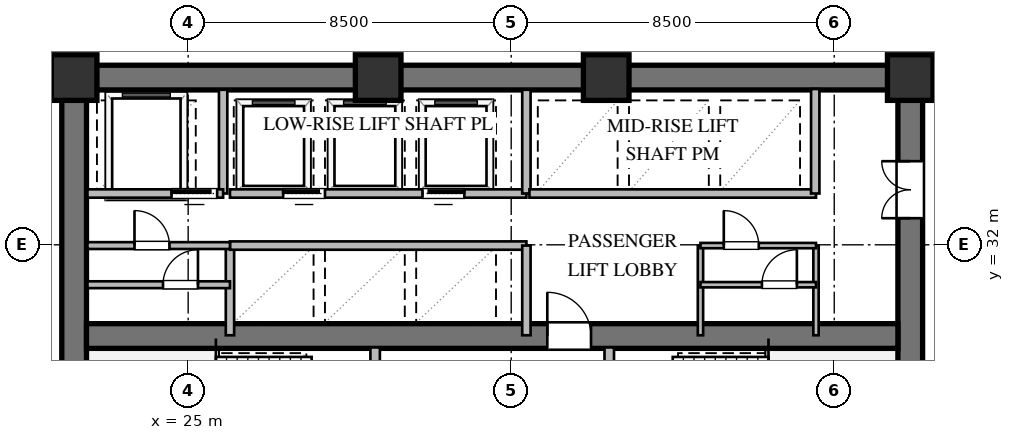
"""IFC4 building model, lengths in metres.
Left out: names, types, materials, properties, quantities, classifications, styles, units other than length and angle.
Written with IfcOpenShell. Run it as: python <this file> out.ifc"""

import sys

from ifc_helpers import new_model, si_unit, direction, frame, frame_2d, origin, origin_2d, place, context, subcontext, project, spatial, rectangle, extrude, element, fill, save


model = new_model("IFC4")
c1 = context("Model", 3, precision=1e-05, world=origin(), true_north=direction((0.0, 1.0)))
c2 = subcontext(c1, "Body", "Model", "MODEL_VIEW")
j1 = project(units=[si_unit("LENGTHUNIT", "METRE"), si_unit("PLANEANGLEUNIT", "RADIAN")], contexts=[c1])
p1 = place(None, origin())
s1 = spatial("IfcSite", under=j1, at=p1, CompositionType="ELEMENT")
p2 = place(p1, origin())
s2 = spatial("IfcBuilding", under=s1, at=p2, CompositionType="ELEMENT")
p3 = place(p2, frame((0.0, 0.0, 24.0)))
s3 = spatial("IfcBuildingStorey", under=s2, at=p3, CompositionType="ELEMENT", Elevation=24.0)
p4 = place(p3, frame((21.675, 36.4, 0.0), z_axis=(0.0, 0.0, 1.0), x_axis=(1.0, 0.0, 0.0)))
e1 = element("IfcWall", 1, at=p4, inside=s3, PredefinedType="SHEAR", context=c2, shape_type="SweptSolid", body=[
    extrude(rectangle(XDim=22.65, YDim=0.65, at=frame_2d((11.325, 0.0))), origin(), (0.0, 0.0, 1.0), 3.36),
])
p5 = place(p3, frame((22.0, 23.925, 0.0), z_axis=(0.0, 0.0, 1.0), x_axis=(0.0, 1.0, 0.0)))
e2 = element("IfcWall", 2, at=p5, inside=s3, PredefinedType="SHEAR", context=c2, shape_type="SweptSolid", body=[
    extrude(rectangle(XDim=12.15, YDim=0.65, at=frame_2d((6.075, 0.0))), origin(), (0.0, 0.0, 1.0), 3.36),
])
p6 = place(p3, frame((44.0, 23.925, 0.0), z_axis=(0.0, 0.0, 1.0), x_axis=(0.0, 1.0, 0.0)))
e3 = element("IfcWall", 3, at=p6, inside=s3, PredefinedType="SHEAR", context=c2, shape_type="SweptSolid", body=[
    extrude(rectangle(XDim=12.15, YDim=0.65, at=frame_2d((6.075, 0.0))), origin(), (0.0, 0.0, 1.0), 3.36),
])
p7 = place(p6, frame((8.775, 0.0, 0.0)))
e4 = element("IfcOpeningElement", 4, at=p7, cuts=e3, PredefinedType="OPENING", context=c2, shape_type="SweptSolid", body=[
    extrude(rectangle(XDim=1.5, YDim=2.15, at=frame_2d((0.75, 1.075))), frame((0.0, 0.335, 0.0), z_axis=(0.0, -1.0, 0.0), x_axis=(1.0, 0.0, 0.0)), (0.0, 0.0, 1.0), 0.67),
])
p8 = place(p3, frame((22.325, 29.6, 0.0), z_axis=(0.0, 0.0, 1.0), x_axis=(1.0, 0.0, 0.0)))
e5 = element("IfcWall", 5, at=p8, inside=s3, PredefinedType="SHEAR", context=c2, shape_type="SweptSolid", body=[
    extrude(rectangle(XDim=21.35, YDim=0.65, at=frame_2d((10.675, 0.0))), origin(), (0.0, 0.0, 1.0), 3.36),
])
p9 = place(p8, frame((12.125, 0.0, 0.0)))
e6 = element("IfcOpeningElement", 6, at=p9, cuts=e5, PredefinedType="OPENING", context=c2, shape_type="SweptSolid", body=[
    extrude(rectangle(XDim=1.15, YDim=2.1, at=frame_2d((0.575, 1.05))), frame((0.0, 0.335, 0.0), z_axis=(0.0, -1.0, 0.0), x_axis=(1.0, 0.0, 0.0)), (0.0, 0.0, 1.0), 0.67),
])
for number, where, z_axis, x_axis in (
    (7, (44.0, 36.4, 0.0), (0.0, 0.0, 1.0), (1.0, 0.0, 0.0)),
    (8, (36.0, 36.4, 0.0), (0.0, 0.0, 1.0), (1.0, 0.0, 0.0)),
    (9, (30.0, 36.4, 0.0), (0.0, 0.0, 1.0), (1.0, 0.0, 0.0)),
    (10, (22.0, 36.4, 0.0), (0.0, 0.0, 1.0), (1.0, 0.0, 0.0)),
):
    element("IfcColumn", number, at=place(p3, frame(where, z_axis=z_axis, x_axis=x_axis)), inside=s3, PredefinedType="COLUMN", context=c2, shape_type="SweptSolid", body=[
        extrude(rectangle(XDim=1.2, YDim=1.2, at=origin_2d()), origin(), (0.0, 0.0, 1.0), 3.6),
    ])
p10 = place(p3, frame((29.92, 23.9, 0.0), z_axis=(0.0, 0.0, 1.0), x_axis=(0.0, 1.0, 0.0)))
e11 = element("IfcWall", 11, at=p10, inside=s3, PredefinedType="SOLIDWALL", context=c2, shape_type="SweptSolid", body=[
    extrude(rectangle(XDim=5.4, YDim=0.25, at=frame_2d((2.7, 0.0))), origin(), (0.0, 0.0, 1.0), 3.36),
])
p11 = place(p10, frame((3.421, 0.0, 0.0)))
e12 = element("IfcOpeningElement", 12, at=p11, cuts=e11, PredefinedType="OPENING", context=c2, shape_type="SweptSolid", body=[
    extrude(rectangle(XDim=1.15, YDim=2.1, at=frame_2d((0.575, 1.05))), frame((0.0, 0.135, 0.0), z_axis=(0.0, -1.0, 0.0), x_axis=(1.0, 0.0, 0.0)), (0.0, 0.0, 1.0), 0.27),
])
p12 = place(p3, frame((36.08, 23.9, 0.0), z_axis=(0.0, 0.0, 1.0), x_axis=(0.0, 1.0, 0.0)))
e13 = element("IfcWall", 13, at=p12, inside=s3, PredefinedType="SOLIDWALL", context=c2, shape_type="SweptSolid", body=[
    extrude(rectangle(XDim=5.4, YDim=0.25, at=frame_2d((2.7, 0.0))), origin(), (0.0, 0.0, 1.0), 3.36),
])
p13 = place(p12, frame((3.421, 0.0, 0.0)))
e14 = element("IfcOpeningElement", 14, at=p13, cuts=e13, PredefinedType="OPENING", context=c2, shape_type="SweptSolid", body=[
    extrude(rectangle(XDim=1.15, YDim=2.1, at=frame_2d((0.575, 1.05))), frame((0.0, 0.135, 0.0), z_axis=(0.0, -1.0, 0.0), x_axis=(1.0, 0.0, 0.0)), (0.0, 0.0, 1.0), 0.27),
])
p14 = place(p3, frame((25.92, 33.35, 0.0), z_axis=(0.0, 0.0, 1.0), x_axis=(0.0, 1.0, 0.0)))
e15 = element("IfcWall", 15, at=p14, inside=s3, PredefinedType="SOLIDWALL", context=c2, shape_type="SweptSolid", body=[
    extrude(rectangle(XDim=2.73, YDim=0.22, at=frame_2d((1.365, 0.0))), origin(), (0.0, 0.0, 1.0), 3.36),
])
p15 = place(p3, frame((22.35, 33.35, 0.0), z_axis=(0.0, 0.0, 1.0), x_axis=(1.0, 0.0, 0.0)))
e16 = element("IfcWall", 16, at=p15, inside=s3, PredefinedType="SOLIDWALL", context=c2, shape_type="SweptSolid", body=[
    extrude(rectangle(XDim=3.57, YDim=0.22, at=frame_2d((1.785, 0.0))), origin(), (0.0, 0.0, 1.0), 3.36),
])
p16 = place(p15, frame((2.213, 0.0, 0.0)))
e17 = element("IfcOpeningElement", 17, at=p16, cuts=e16, PredefinedType="OPENING", context=c2, shape_type="SweptSolid", body=[
    extrude(rectangle(XDim=1.2, YDim=2.1, at=frame_2d((0.6, 1.05))), frame((0.0, 0.12, 0.0), z_axis=(0.0, -1.0, 0.0), x_axis=(1.0, 0.0, 0.0)), (0.0, 0.0, 1.0), 0.24),
])
p17 = place(p3, frame((26.1, 29.62, 0.0), z_axis=(0.0, 0.0, 1.0), x_axis=(0.0, 1.0, 0.0)))
e18 = element("IfcWall", 18, at=p17, inside=s3, PredefinedType="SOLIDWALL", context=c2, shape_type="SweptSolid", body=[
    extrude(rectangle(XDim=2.36, YDim=0.22, at=frame_2d((1.18, 0.0))), origin(), (0.0, 0.0, 1.0), 3.36),
])
p18 = place(p3, frame((26.1, 31.98, 0.0), z_axis=(0.0, 0.0, 1.0), x_axis=(1.0, 0.0, 0.0)))
e19 = element("IfcWall", 19, at=p18, inside=s3, PredefinedType="SOLIDWALL", context=c2, shape_type="SweptSolid", body=[
    extrude(rectangle(XDim=7.8, YDim=0.22, at=frame_2d((3.9, 0.0))), origin(), (0.0, 0.0, 1.0), 3.36),
])
p19 = place(p3, frame((33.9, 29.62, 0.0), z_axis=(0.0, 0.0, 1.0), x_axis=(0.0, 1.0, 0.0)))
e20 = element("IfcWall", 20, at=p19, inside=s3, PredefinedType="SOLIDWALL", context=c2, shape_type="SweptSolid", body=[
    extrude(rectangle(XDim=2.36, YDim=0.22, at=frame_2d((1.18, 0.0))), origin(), (0.0, 0.0, 1.0), 3.36),
])
p20 = place(p3, frame((26.1, 33.35, 0.0), z_axis=(0.0, 0.0, 1.0), x_axis=(1.0, 0.0, 0.0)))
e21 = element("IfcWall", 21, at=p20, inside=s3, PredefinedType="SOLIDWALL", context=c2, shape_type="SweptSolid", body=[
    extrude(rectangle(XDim=7.8, YDim=0.22, at=frame_2d((3.9, 0.0))), origin(), (0.0, 0.0, 1.0), 3.36),
])
p21 = place(p20, frame((1.4, 0.0, 0.0)))
e22 = element("IfcOpeningElement", 22, at=p21, cuts=e21, PredefinedType="OPENING", context=c2, shape_type="SweptSolid", body=[
    extrude(rectangle(XDim=1.1, YDim=2.1, at=frame_2d((0.55, 1.05))), frame((0.0, 0.12, 0.0), z_axis=(0.0, -1.0, 0.0), x_axis=(1.0, 0.0, 0.0)), (0.0, 0.0, 1.0), 0.24),
])
p22 = place(p20, frame((5.066, 0.0, 0.0)))
e23 = element("IfcOpeningElement", 23, at=p22, cuts=e21, PredefinedType="OPENING", context=c2, shape_type="SweptSolid", body=[
    extrude(rectangle(XDim=1.1, YDim=2.1, at=frame_2d((0.55, 1.05))), frame((0.0, 0.12, 0.0), z_axis=(0.0, -1.0, 0.0), x_axis=(1.0, 0.0, 0.0)), (0.0, 0.0, 1.0), 0.24),
])
p23 = place(p3, frame((33.9, 33.35, 0.0), z_axis=(0.0, 0.0, 1.0), x_axis=(0.0, 1.0, 0.0)))
e24 = element("IfcWall", 24, at=p23, inside=s3, PredefinedType="SOLIDWALL", context=c2, shape_type="SweptSolid", body=[
    extrude(rectangle(XDim=2.73, YDim=0.22, at=frame_2d((1.365, 0.0))), origin(), (0.0, 0.0, 1.0), 3.36),
])
p24 = place(p3, frame((33.98, 33.35, 0.0), z_axis=(0.0, 0.0, 1.0), x_axis=(1.0, 0.0, 0.0)))
e25 = element("IfcWall", 25, at=p24, inside=s3, PredefinedType="SOLIDWALL", context=c2, shape_type="SweptSolid", body=[
    extrude(rectangle(XDim=7.54, YDim=0.22, at=frame_2d((3.77, 0.0))), origin(), (0.0, 0.0, 1.0), 3.36),
])
p25 = place(p3, frame((41.5, 33.35, 0.0), z_axis=(0.0, 0.0, 1.0), x_axis=(0.0, 1.0, 0.0)))
e26 = element("IfcWall", 26, at=p25, inside=s3, PredefinedType="SOLIDWALL", context=c2, shape_type="SweptSolid", body=[
    extrude(rectangle(XDim=2.75, YDim=0.22, at=frame_2d((1.375, 0.0))), origin(), (0.0, 0.0, 1.0), 3.36),
])
p26 = place(p3, frame((22.35, 30.95, 0.0), z_axis=(0.0, 0.0, 1.0), x_axis=(1.0, 0.0, 0.0)))
e27 = element("IfcWall", 27, at=p26, inside=s3, PredefinedType="PARTITIONING", context=c2, shape_type="SweptSolid", body=[
    extrude(rectangle(XDim=3.75, YDim=0.18, at=frame_2d((1.875, 0.0))), origin(), (0.0, 0.0, 1.0), 3.36),
])
p27 = place(p26, frame((1.988, 0.0, 0.0)))
e28 = element("IfcOpeningElement", 28, at=p27, cuts=e27, PredefinedType="OPENING", context=c2, shape_type="SweptSolid", body=[
    extrude(rectangle(XDim=0.92, YDim=2.1, at=frame_2d((0.46, 1.05))), frame((0.0, 0.1, 0.0), z_axis=(0.0, -1.0, 0.0), x_axis=(1.0, 0.0, 0.0)), (0.0, 0.0, 1.0), 0.2),
])
p28 = place(p3, frame((22.35, 31.98, 0.0), z_axis=(0.0, 0.0, 1.0), x_axis=(1.0, 0.0, 0.0)))
e29 = element("IfcWall", 29, at=p28, inside=s3, PredefinedType="PARTITIONING", context=c2, shape_type="SweptSolid", body=[
    extrude(rectangle(XDim=3.75, YDim=0.18, at=frame_2d((1.875, 0.0))), origin(), (0.0, 0.0, 1.0), 3.36),
])
p29 = place(p28, frame((1.238, 0.0, 0.0)))
e30 = element("IfcOpeningElement", 30, at=p29, cuts=e29, PredefinedType="OPENING", context=c2, shape_type="SweptSolid", body=[
    extrude(rectangle(XDim=0.92, YDim=2.1, at=frame_2d((0.46, 1.05))), frame((0.0, 0.1, 0.0), z_axis=(0.0, -1.0, 0.0), x_axis=(1.0, 0.0, 0.0)), (0.0, 0.0, 1.0), 0.2),
])
for number, where, z_axis, x_axis in (
    (31, (38.48, 29.62, 0.0), (0.0, 0.0, 1.0), (0.0, 1.0, 0.0)),
    (32, (41.52, 29.62, 0.0), (0.0, 0.0, 1.0), (0.0, 1.0, 0.0)),
):
    element("IfcWall", number, at=place(p3, frame(where, z_axis=z_axis, x_axis=x_axis)), inside=s3, PredefinedType="PARTITIONING", context=c2, shape_type="SweptSolid", body=[
        extrude(rectangle(XDim=2.36, YDim=0.14, at=frame_2d((1.18, 0.0))), origin(), (0.0, 0.0, 1.0), 3.36),
    ])
p30 = place(p3, frame((38.48, 30.95, 0.0), z_axis=(0.0, 0.0, 1.0), x_axis=(1.0, 0.0, 0.0)))
e33 = element("IfcWall", 33, at=p30, inside=s3, PredefinedType="PARTITIONING", context=c2, shape_type="SweptSolid", body=[
    extrude(rectangle(XDim=3.04, YDim=0.14, at=frame_2d((1.52, 0.0))), origin(), (0.0, 0.0, 1.0), 3.36),
])
p31 = place(p30, frame((1.617, 0.0, 0.0)))
e34 = element("IfcOpeningElement", 34, at=p31, cuts=e33, PredefinedType="OPENING", context=c2, shape_type="SweptSolid", body=[
    extrude(rectangle(XDim=0.92, YDim=2.1, at=frame_2d((0.46, 1.05))), frame((0.0, 0.08, 0.0), z_axis=(0.0, -1.0, 0.0), x_axis=(1.0, 0.0, 0.0)), (0.0, 0.0, 1.0), 0.16),
])
p32 = place(p3, frame((38.48, 31.98, 0.0), z_axis=(0.0, 0.0, 1.0), x_axis=(1.0, 0.0, 0.0)))
e35 = element("IfcWall", 35, at=p32, inside=s3, PredefinedType="PARTITIONING", context=c2, shape_type="SweptSolid", body=[
    extrude(rectangle(XDim=3.04, YDim=0.14, at=frame_2d((1.52, 0.0))), origin(), (0.0, 0.0, 1.0), 3.36),
])
p33 = place(p32, frame((0.614, 0.0, 0.0)))
e36 = element("IfcOpeningElement", 36, at=p33, cuts=e35, PredefinedType="OPENING", context=c2, shape_type="SweptSolid", body=[
    extrude(rectangle(XDim=0.92, YDim=2.1, at=frame_2d((0.46, 1.05))), frame((0.0, 0.08, 0.0), z_axis=(0.0, -1.0, 0.0), x_axis=(1.0, 0.0, 0.0)), (0.0, 0.0, 1.0), 0.16),
])
p34 = place(p9, origin())
e37 = element("IfcDoor", 37, at=p34, inside=s3, OperationType="SINGLE_SWING_LEFT", PredefinedType="DOOR", context=c2, shape_type="SweptSolid", body=[
    extrude(rectangle(XDim=1.15, YDim=2.1, at=frame_2d((0.575, 1.05))), frame((0.0, 0.025, 0.0), z_axis=(0.0, -1.0, 0.0), x_axis=(1.0, 0.0, 0.0)), (0.0, 0.0, 1.0), 0.05),
])
fill(e6, e37)
p35 = place(p7, origin())
e38 = element("IfcDoor", 38, at=p35, inside=s3, OperationType="DOUBLE_DOOR_SINGLE_SWING", PredefinedType="DOOR", context=c2, shape_type="SweptSolid", body=[
    extrude(rectangle(XDim=1.5, YDim=2.15, at=frame_2d((0.75, 1.075))), frame((0.0, 0.025, 0.0), z_axis=(0.0, -1.0, 0.0), x_axis=(1.0, 0.0, 0.0)), (0.0, 0.0, 1.0), 0.05),
])
fill(e4, e38)
p36 = place(p16, origin())
e39 = element("IfcDoor", 39, at=p36, inside=s3, OperationType="SLIDING_TO_LEFT", PredefinedType="DOOR", context=c2, shape_type="SweptSolid", body=[
    extrude(rectangle(XDim=1.2, YDim=2.1, at=frame_2d((0.6, 1.05))), frame((0.0, 0.025, 0.0), z_axis=(0.0, -1.0, 0.0), x_axis=(1.0, 0.0, 0.0)), (0.0, 0.0, 1.0), 0.05),
])
fill(e17, e39)
p37 = place(p21, origin())
e40 = element("IfcDoor", 40, at=p37, inside=s3, OperationType="SLIDING_TO_LEFT", PredefinedType="DOOR", context=c2, shape_type="SweptSolid", body=[
    extrude(rectangle(XDim=1.1, YDim=2.1, at=frame_2d((0.55, 1.05))), frame((0.0, 0.025, 0.0), z_axis=(0.0, -1.0, 0.0), x_axis=(1.0, 0.0, 0.0)), (0.0, 0.0, 1.0), 0.05),
])
fill(e22, e40)
p38 = place(p22, origin())
e41 = element("IfcDoor", 41, at=p38, inside=s3, OperationType="SLIDING_TO_RIGHT", PredefinedType="DOOR", context=c2, shape_type="SweptSolid", body=[
    extrude(rectangle(XDim=1.1, YDim=2.1, at=frame_2d((0.55, 1.05))), frame((0.0, 0.025, 0.0), z_axis=(0.0, -1.0, 0.0), x_axis=(1.0, 0.0, 0.0)), (0.0, 0.0, 1.0), 0.05),
])
fill(e23, e41)
p39 = place(p29, origin())
e42 = element("IfcDoor", 42, at=p39, inside=s3, OperationType="SINGLE_SWING_LEFT", PredefinedType="DOOR", context=c2, shape_type="SweptSolid", body=[
    extrude(rectangle(XDim=0.92, YDim=2.1, at=frame_2d((0.46, 1.05))), frame((0.0, 0.025, 0.0), z_axis=(0.0, -1.0, 0.0), x_axis=(1.0, 0.0, 0.0)), (0.0, 0.0, 1.0), 0.05),
])
fill(e30, e42)
p40 = place(p27, origin())
e43 = element("IfcDoor", 43, at=p40, inside=s3, OperationType="SINGLE_SWING_RIGHT", PredefinedType="DOOR", context=c2, shape_type="SweptSolid", body=[
    extrude(rectangle(XDim=0.92, YDim=2.1, at=frame_2d((0.46, 1.05))), frame((0.0, 0.025, 0.0), z_axis=(0.0, -1.0, 0.0), x_axis=(1.0, 0.0, 0.0)), (0.0, 0.0, 1.0), 0.05),
])
fill(e28, e43)
p41 = place(p33, origin())
e44 = element("IfcDoor", 44, at=p41, inside=s3, OperationType="SINGLE_SWING_LEFT", PredefinedType="DOOR", context=c2, shape_type="SweptSolid", body=[
    extrude(rectangle(XDim=0.92, YDim=2.1, at=frame_2d((0.46, 1.05))), frame((0.0, 0.025, 0.0), z_axis=(0.0, -1.0, 0.0), x_axis=(1.0, 0.0, 0.0)), (0.0, 0.0, 1.0), 0.05),
])
fill(e36, e44)
p42 = place(p31, origin())
e45 = element("IfcDoor", 45, at=p42, inside=s3, OperationType="SINGLE_SWING_RIGHT", PredefinedType="DOOR", context=c2, shape_type="SweptSolid", body=[
    extrude(rectangle(XDim=0.92, YDim=2.1, at=frame_2d((0.46, 1.05))), frame((0.0, 0.025, 0.0), z_axis=(0.0, -1.0, 0.0), x_axis=(1.0, 0.0, 0.0)), (0.0, 0.0, 1.0), 0.05),
])
fill(e34, e45)
save(model, sys.argv[1])
